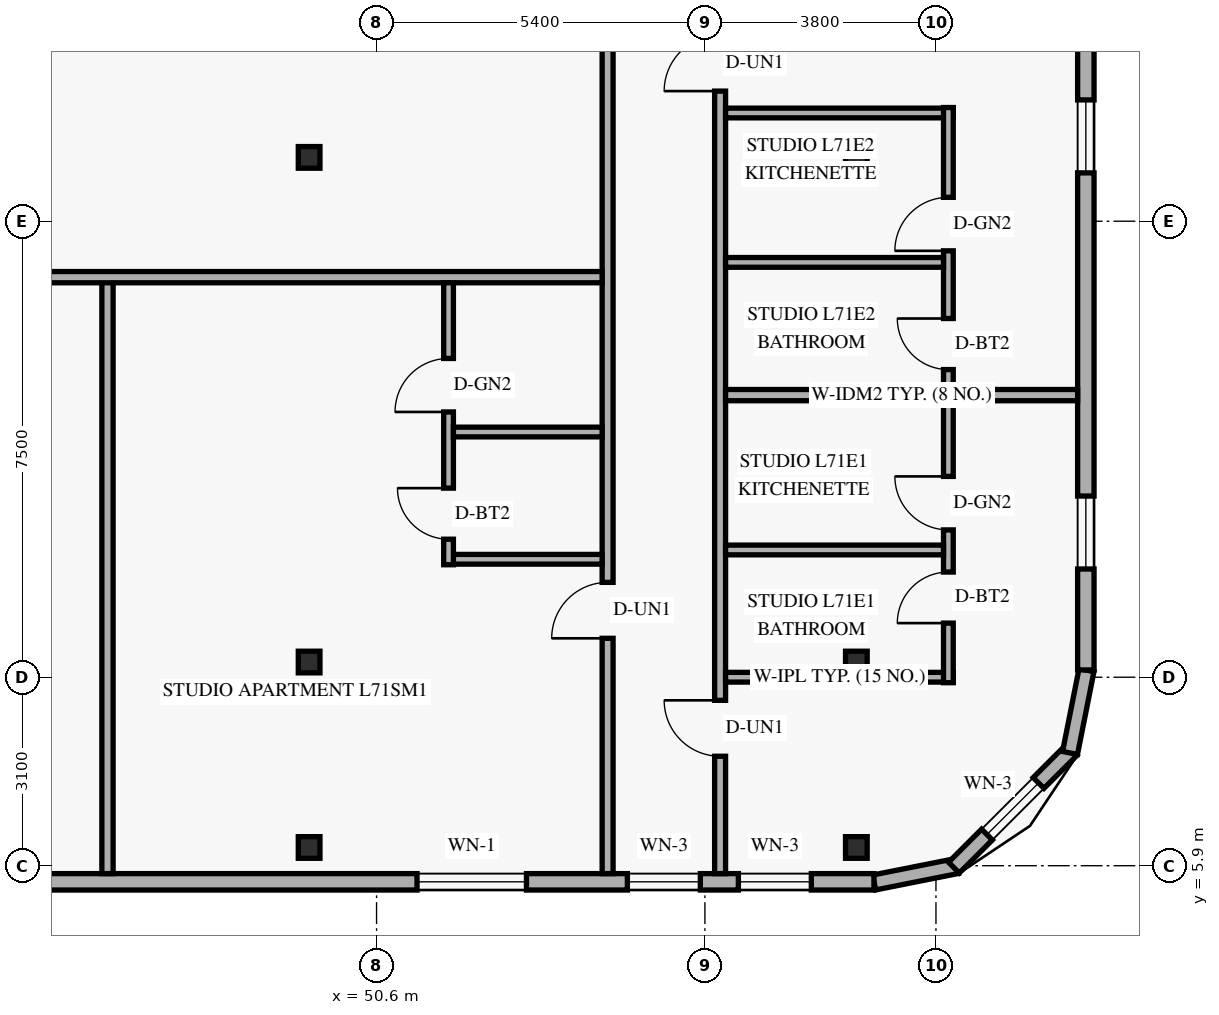
"""IFC4 building model, lengths in metres.
Left out: names, types, materials, properties, quantities, classifications, styles, units other than length and angle.
Written with IfcOpenShell. Run it as: python <this file> out.ifc"""

import sys

from ifc_helpers import new_model, si_unit, direction, frame, frame_2d, origin, origin_2d, place, context, subcontext, project, spatial, rectangle, hollow_rectangle, extrude, element, fill, save


model = new_model("IFC4")
c1 = context("Model", 3, precision=1e-05, world=origin(), true_north=direction((0.0, 1.0)))
c2 = subcontext(c1, "Body", "Model", "MODEL_VIEW")
j1 = project(units=[si_unit("LENGTHUNIT", "METRE"), si_unit("PLANEANGLEUNIT", "RADIAN")], contexts=[c1])
p1 = place(None, origin())
s1 = spatial("IfcSite", under=j1, at=p1, CompositionType="ELEMENT")
p2 = place(p1, origin())
s2 = spatial("IfcBuilding", under=s1, at=p2, CompositionType="ELEMENT")
p3 = place(p2, frame((0.0, 0.0, 271.2)))
s3 = spatial("IfcBuildingStorey", under=s2, at=p3, CompositionType="ELEMENT", Elevation=271.2)
for number, where, z_axis, x_axis in (
    (1, (49.428, 6.2, 0.0), (0.035, 0.0, 0.999), (0.0, 1.0, 0.0)),
    (2, (49.428, 9.25, 0.0), (0.035, 0.0, 0.999), (0.0, 1.0, 0.0)),
    (3, (49.428, 17.55, 0.0), (0.035, 0.0, 0.999), (0.0, 1.0, 0.0)),
):
    element("IfcColumn", number, at=place(p3, frame(where, z_axis=z_axis, x_axis=x_axis)), inside=s3, PredefinedType="COLUMN", context=c2, shape_type="SweptSolid", body=[
        extrude(hollow_rectangle(XDim=0.356, YDim=0.356, WallThickness=0.016, at=origin_2d()), origin(), (0.0, 0.0, 1.0), 3.602),
    ])
for number, where, z_axis, x_axis in (
    (4, (58.386, 6.2, 0.0), (0.058, 0.0, 0.998), (0.0, 1.0, 0.0)),
    (5, (58.386, 9.25, 0.0), (0.058, 0.0, 0.998), (0.0, 1.0, 0.0)),
    (6, (58.386, 17.55, 0.0), (0.058, 0.0, 0.998), (0.0, 1.0, 0.0)),
):
    element("IfcColumn", number, at=place(p3, frame(where, z_axis=z_axis, x_axis=x_axis)), inside=s3, PredefinedType="COLUMN", context=c2, shape_type="SweptSolid", body=[
        extrude(hollow_rectangle(XDim=0.356, YDim=0.356, WallThickness=0.016, at=origin_2d()), origin(), (0.0, 0.0, 1.0), 3.606),
    ])
p4 = place(p3, frame((58.783, 5.624, 0.0), z_axis=(0.0, 0.0, 1.0), x_axis=(0.980809899341, 0.19496651342, 0.0)))
e7 = element("IfcWall", 7, at=p4, inside=s3, PredefinedType="SOLIDWALL", context=c2, shape_type="SweptSolid", body=[
    extrude(rectangle(XDim=1.389, YDim=0.25, at=frame_2d((0.694, 0.0))), origin(), (0.0, 0.0, 1.0), 3.36),
])
p5 = place(p3, frame((60.095, 5.868, 0.0), z_axis=(0.0, 0.0, 1.0), x_axis=(0.707106781187, 0.707106781187, 0.0)))
e8 = element("IfcWall", 8, at=p5, inside=s3, PredefinedType="SOLIDWALL", context=c2, shape_type="SweptSolid", body=[
    extrude(rectangle(XDim=2.739, YDim=0.25, at=frame_2d((1.37, 0.0))), origin(), (0.0, 0.0, 1.0), 3.36),
])
p6 = place(p5, frame((0.77, 0.0, 0.85)))
e9 = element("IfcOpeningElement", 9, at=p6, cuts=e8, PredefinedType="OPENING", context=c2, shape_type="SweptSolid", body=[
    extrude(rectangle(XDim=1.2, YDim=1.5, at=frame_2d((0.6, 0.75))), frame((0.0, 0.135, 0.0), z_axis=(0.0, -1.0, 0.0), x_axis=(1.0, 0.0, 0.0)), (0.0, 0.0, 1.0), 0.27),
])
p7 = place(p3, frame((62.005, 7.754, 0.0), z_axis=(0.0, 0.0, 1.0), x_axis=(0.195135625965, 0.9807762678, 0.0)))
e10 = element("IfcWall", 10, at=p7, inside=s3, PredefinedType="SOLIDWALL", context=c2, shape_type="SweptSolid", body=[
    extrude(rectangle(XDim=1.389, YDim=0.25, at=frame_2d((0.694, 0.0))), origin(), (0.0, 0.0, 1.0), 3.36),
])
p8 = place(p3, frame((25.82, 5.635, 0.0), z_axis=(0.0, 0.0, 1.0), x_axis=(1.0, 0.0, 0.0)))
e11 = element("IfcWall", 11, at=p8, inside=s3, PredefinedType="SOLIDWALL", context=c2, shape_type="SweptSolid", body=[
    extrude(rectangle(XDim=32.96, YDim=0.27, at=frame_2d((16.48, 0.0))), origin(), (0.0, 0.0, 1.0), 3.36),
])
p9 = place(p8, frame((14.188, 0.0, 0.85)))
e12 = element("IfcOpeningElement", 12, at=p9, cuts=e11, PredefinedType="OPENING", context=c2, shape_type="SweptSolid", body=[
    extrude(rectangle(XDim=1.8, YDim=1.6, at=frame_2d((0.9, 0.8))), frame((0.0, 0.145, 0.0), z_axis=(0.0, -1.0, 0.0), x_axis=(1.0, 0.0, 0.0)), (0.0, 0.0, 1.0), 0.29),
])
p10 = place(p8, frame((25.446, 0.0, 0.85)))
e13 = element("IfcOpeningElement", 13, at=p10, cuts=e11, PredefinedType="OPENING", context=c2, shape_type="SweptSolid", body=[
    extrude(rectangle(XDim=1.8, YDim=1.6, at=frame_2d((0.9, 0.8))), frame((0.0, 0.145, 0.0), z_axis=(0.0, -1.0, 0.0), x_axis=(1.0, 0.0, 0.0)), (0.0, 0.0, 1.0), 0.29),
])
p11 = place(p8, frame((28.905, 0.0, 0.85)))
e14 = element("IfcOpeningElement", 14, at=p11, cuts=e11, PredefinedType="OPENING", context=c2, shape_type="SweptSolid", body=[
    extrude(rectangle(XDim=1.2, YDim=1.5, at=frame_2d((0.6, 0.75))), frame((0.0, 0.145, 0.0), z_axis=(0.0, -1.0, 0.0), x_axis=(1.0, 0.0, 0.0)), (0.0, 0.0, 1.0), 0.29),
])
p12 = place(p8, frame((30.73, 0.0, 0.85)))
e15 = element("IfcOpeningElement", 15, at=p12, cuts=e11, PredefinedType="OPENING", context=c2, shape_type="SweptSolid", body=[
    extrude(rectangle(XDim=1.2, YDim=1.5, at=frame_2d((0.6, 0.75))), frame((0.0, 0.145, 0.0), z_axis=(0.0, -1.0, 0.0), x_axis=(1.0, 0.0, 0.0)), (0.0, 0.0, 1.0), 0.29),
])
p13 = place(p3, frame((62.265, 9.12, 0.0), z_axis=(0.0, 0.0, 1.0), x_axis=(0.0, 1.0, 0.0)))
e16 = element("IfcWall", 16, at=p13, inside=s3, PredefinedType="SOLIDWALL", context=c2, shape_type="SweptSolid", body=[
    extrude(rectangle(XDim=29.76, YDim=0.27, at=frame_2d((14.88, 0.0))), origin(), (0.0, 0.0, 1.0), 3.36),
])
p14 = place(p13, frame((1.66, 0.0, 0.85)))
e17 = element("IfcOpeningElement", 17, at=p14, cuts=e16, PredefinedType="OPENING", context=c2, shape_type="SweptSolid", body=[
    extrude(rectangle(XDim=1.2, YDim=1.5, at=frame_2d((0.6, 0.75))), frame((0.0, 0.145, 0.0), z_axis=(0.0, -1.0, 0.0), x_axis=(1.0, 0.0, 0.0)), (0.0, 0.0, 1.0), 0.29),
])
p15 = place(p13, frame((8.175, 0.0, 0.85)))
e18 = element("IfcOpeningElement", 18, at=p15, cuts=e16, PredefinedType="OPENING", context=c2, shape_type="SweptSolid", body=[
    extrude(rectangle(XDim=1.2, YDim=1.5, at=frame_2d((0.6, 0.75))), frame((0.0, 0.145, 0.0), z_axis=(0.0, -1.0, 0.0), x_axis=(1.0, 0.0, 0.0)), (0.0, 0.0, 1.0), 0.29),
])
p16 = place(p13, frame((16.685, 0.0, 0.85)))
e19 = element("IfcOpeningElement", 19, at=p16, cuts=e16, PredefinedType="OPENING", context=c2, shape_type="SweptSolid", body=[
    extrude(rectangle(XDim=1.2, YDim=1.5, at=frame_2d((0.6, 0.75))), frame((0.0, 0.145, 0.0), z_axis=(0.0, -1.0, 0.0), x_axis=(1.0, 0.0, 0.0)), (0.0, 0.0, 1.0), 0.29),
])
p17 = place(p13, frame((23.9, 0.0, 0.85)))
e20 = element("IfcOpeningElement", 20, at=p17, cuts=e16, PredefinedType="OPENING", context=c2, shape_type="SweptSolid", body=[
    extrude(rectangle(XDim=1.2, YDim=1.5, at=frame_2d((0.6, 0.75))), frame((0.0, 0.145, 0.0), z_axis=(0.0, -1.0, 0.0), x_axis=(1.0, 0.0, 0.0)), (0.0, 0.0, 1.0), 0.29),
])
p18 = place(p13, frame((28.01, 0.0, 0.85)))
e21 = element("IfcOpeningElement", 21, at=p18, cuts=e16, PredefinedType="OPENING", context=c2, shape_type="SweptSolid", body=[
    extrude(rectangle(XDim=1.2, YDim=1.5, at=frame_2d((0.6, 0.75))), frame((0.0, 0.145, 0.0), z_axis=(0.0, -1.0, 0.0), x_axis=(1.0, 0.0, 0.0)), (0.0, 0.0, 1.0), 0.29),
])
p19 = place(p3, frame((54.4, 5.77, 0.0), z_axis=(0.0, 0.0, 1.0), x_axis=(0.0, 1.0, 0.0)))
e22 = element("IfcWall", 22, at=p19, inside=s3, PredefinedType="STANDARD", context=c2, shape_type="SweptSolid", body=[
    extrude(rectangle(XDim=14.63, YDim=0.18, at=frame_2d((7.315, 0.0))), origin(), (0.0, 0.0, 1.0), 2.803),
])
p20 = place(p19, frame((3.87, 0.0, 0.0)))
e23 = element("IfcOpeningElement", 23, at=p20, cuts=e22, PredefinedType="OPENING", context=c2, shape_type="SweptSolid", body=[
    extrude(rectangle(XDim=0.92, YDim=2.15, at=frame_2d((0.46, 1.075))), frame((0.0, 0.1, 0.0), z_axis=(0.0, -1.0, 0.0), x_axis=(1.0, 0.0, 0.0)), (0.0, 0.0, 1.0), 0.2),
])
p21 = place(p3, frame((56.25, 5.77, 0.0), z_axis=(0.0, 0.0, 1.0), x_axis=(0.0, 1.0, 0.0)))
e24 = element("IfcWall", 24, at=p21, inside=s3, PredefinedType="STANDARD", context=c2, shape_type="SweptSolid", body=[
    extrude(rectangle(XDim=36.46, YDim=0.18, at=frame_2d((18.23, 0.0))), origin(), (0.0, 0.0, 1.0), 2.803),
])
p22 = place(p21, frame((1.93, 0.0, 0.0)))
e25 = element("IfcOpeningElement", 25, at=p22, cuts=e24, PredefinedType="OPENING", context=c2, shape_type="SweptSolid", body=[
    extrude(rectangle(XDim=0.92, YDim=2.15, at=frame_2d((0.46, 1.075))), frame((0.0, 0.1, 0.0), z_axis=(0.0, -1.0, 0.0), x_axis=(1.0, 0.0, 0.0)), (0.0, 0.0, 1.0), 0.2),
])
p23 = place(p21, frame((12.87, 0.0, 0.0)))
e26 = element("IfcOpeningElement", 26, at=p23, cuts=e24, PredefinedType="OPENING", context=c2, shape_type="SweptSolid", body=[
    extrude(rectangle(XDim=0.92, YDim=2.15, at=frame_2d((0.46, 1.075))), frame((0.0, 0.1, 0.0), z_axis=(0.0, -1.0, 0.0), x_axis=(1.0, 0.0, 0.0)), (0.0, 0.0, 1.0), 0.2),
])
p24 = place(p21, frame((21.38, 0.0, 0.0)))
e27 = element("IfcOpeningElement", 27, at=p24, cuts=e24, PredefinedType="OPENING", context=c2, shape_type="SweptSolid", body=[
    extrude(rectangle(XDim=0.92, YDim=2.15, at=frame_2d((0.46, 1.075))), frame((0.0, 0.1, 0.0), z_axis=(0.0, -1.0, 0.0), x_axis=(1.0, 0.0, 0.0)), (0.0, 0.0, 1.0), 0.2),
])
p25 = place(p21, frame((27.39, 0.0, 0.0)))
e28 = element("IfcOpeningElement", 28, at=p25, cuts=e24, PredefinedType="OPENING", context=c2, shape_type="SweptSolid", body=[
    extrude(rectangle(XDim=0.92, YDim=2.15, at=frame_2d((0.46, 1.075))), frame((0.0, 0.1, 0.0), z_axis=(0.0, -1.0, 0.0), x_axis=(1.0, 0.0, 0.0)), (0.0, 0.0, 1.0), 0.2),
])
p26 = place(p21, frame((33.235, 0.0, 0.0)))
e29 = element("IfcOpeningElement", 29, at=p26, cuts=e24, PredefinedType="OPENING", context=c2, shape_type="SweptSolid", body=[
    extrude(rectangle(XDim=0.92, YDim=2.15, at=frame_2d((0.46, 1.075))), frame((0.0, 0.1, 0.0), z_axis=(0.0, -1.0, 0.0), x_axis=(1.0, 0.0, 0.0)), (0.0, 0.0, 1.0), 0.2),
])
p27 = place(p3, frame((56.34, 9.0, 0.0), z_axis=(0.0, 0.0, 1.0), x_axis=(1.0, 0.0, 0.0)))
e30 = element("IfcWall", 30, at=p27, inside=s3, PredefinedType="PLUMBINGWALL", context=c2, shape_type="SweptSolid", body=[
    extrude(rectangle(XDim=3.744, YDim=0.16, at=frame_2d((1.872, 0.0))), origin(), (0.0, 0.0, 1.0), 2.879),
])
p28 = place(p3, frame((60.004, 8.91, 0.0), z_axis=(0.0, 0.0, 1.0), x_axis=(0.0, 1.0, 0.0)))
e31 = element("IfcWall", 31, at=p28, inside=s3, PredefinedType="PLUMBINGWALL", context=c2, shape_type="SweptSolid", body=[
    extrude(rectangle(XDim=4.73, YDim=0.16, at=frame_2d((2.365, 0.0))), origin(), (0.0, 0.0, 1.0), 3.36),
])
p29 = place(p28, frame((0.98, 0.0, 0.0)))
e32 = element("IfcOpeningElement", 32, at=p29, cuts=e31, PredefinedType="OPENING", context=c2, shape_type="SweptSolid", body=[
    extrude(rectangle(XDim=0.84, YDim=2.12, at=frame_2d((0.42, 1.06))), frame((0.0, 0.09, 0.0), z_axis=(0.0, -1.0, 0.0), x_axis=(1.0, 0.0, 0.0)), (0.0, 0.0, 1.0), 0.18),
])
p30 = place(p28, frame((2.513, 0.0, 0.0)))
e33 = element("IfcOpeningElement", 33, at=p30, cuts=e31, PredefinedType="OPENING", context=c2, shape_type="SweptSolid", body=[
    extrude(rectangle(XDim=0.88, YDim=2.12, at=frame_2d((0.44, 1.06))), frame((0.0, 0.09, 0.0), z_axis=(0.0, -1.0, 0.0), x_axis=(1.0, 0.0, 0.0)), (0.0, 0.0, 1.0), 0.18),
])
p31 = place(p3, frame((56.34, 11.093, 0.0), z_axis=(0.0, 0.0, 1.0), x_axis=(1.0, 0.0, 0.0)))
e34 = element("IfcWall", 34, at=p31, inside=s3, PredefinedType="PLUMBINGWALL", context=c2, shape_type="SweptSolid", body=[
    extrude(rectangle(XDim=3.584, YDim=0.16, at=frame_2d((1.792, 0.0))), origin(), (0.0, 0.0, 1.0), 2.879),
])
p32 = place(p3, frame((56.34, 13.64, 0.0), z_axis=(0.0, 0.0, 1.0), x_axis=(1.0, 0.0, 0.0)))
e35 = element("IfcWall", 35, at=p32, inside=s3, PredefinedType="PARTITIONING", context=c2, shape_type="SweptSolid", body=[
    extrude(rectangle(XDim=5.79, YDim=0.185, at=frame_2d((2.895, 0.0))), origin(), (0.0, 0.0, 1.0), 2.879),
])
p33 = place(p3, frame((56.34, 18.28, 0.0), z_axis=(0.0, 0.0, 1.0), x_axis=(1.0, 0.0, 0.0)))
e36 = element("IfcWall", 36, at=p33, inside=s3, PredefinedType="PLUMBINGWALL", context=c2, shape_type="SweptSolid", body=[
    extrude(rectangle(XDim=3.744, YDim=0.16, at=frame_2d((1.872, 0.0))), origin(), (0.0, 0.0, 1.0), 2.879),
])
p34 = place(p3, frame((60.004, 13.732, 0.0), z_axis=(0.0, 0.0, 1.0), x_axis=(0.0, 1.0, 0.0)))
e37 = element("IfcWall", 37, at=p34, inside=s3, PredefinedType="PLUMBINGWALL", context=c2, shape_type="SweptSolid", body=[
    extrude(rectangle(XDim=4.638, YDim=0.16, at=frame_2d((2.319, 0.0))), origin(), (0.0, 0.0, 1.0), 3.36),
])
p35 = place(p34, frame((0.327, 0.0, 0.0)))
e38 = element("IfcOpeningElement", 38, at=p35, cuts=e37, PredefinedType="OPENING", context=c2, shape_type="SweptSolid", body=[
    extrude(rectangle(XDim=0.84, YDim=2.12, at=frame_2d((0.42, 1.06))), frame((0.0, 0.09, 0.0), z_axis=(0.0, -1.0, 0.0), x_axis=(1.0, 0.0, 0.0)), (0.0, 0.0, 1.0), 0.18),
])
p36 = place(p34, frame((2.281, 0.0, 0.0)))
e39 = element("IfcOpeningElement", 39, at=p36, cuts=e37, PredefinedType="OPENING", context=c2, shape_type="SweptSolid", body=[
    extrude(rectangle(XDim=0.88, YDim=2.12, at=frame_2d((0.44, 1.06))), frame((0.0, 0.09, 0.0), z_axis=(0.0, -1.0, 0.0), x_axis=(1.0, 0.0, 0.0)), (0.0, 0.0, 1.0), 0.18),
])
p37 = place(p3, frame((56.34, 15.823, 0.0), z_axis=(0.0, 0.0, 1.0), x_axis=(1.0, 0.0, 0.0)))
e40 = element("IfcWall", 40, at=p37, inside=s3, PredefinedType="PLUMBINGWALL", context=c2, shape_type="SweptSolid", body=[
    extrude(rectangle(XDim=3.584, YDim=0.16, at=frame_2d((1.792, 0.0))), origin(), (0.0, 0.0, 1.0), 2.879),
])
p38 = place(p3, frame((46.175, 5.77, 0.0), z_axis=(0.0, 0.0, 1.0), x_axis=(0.0, 1.0, 0.0)))
e41 = element("IfcWall", 41, at=p38, inside=s3, PredefinedType="PARTITIONING", context=c2, shape_type="SweptSolid", body=[
    extrude(rectangle(XDim=9.81, YDim=0.185, at=frame_2d((4.905, 0.0))), origin(), (0.0, 0.0, 1.0), 2.803),
])
p39 = place(p3, frame((38.022, 15.58, 0.0), z_axis=(0.0, 0.0, 1.0), x_axis=(1.0, 0.0, 0.0)))
e42 = element("IfcWall", 42, at=p39, inside=s3, PredefinedType="PARTITIONING", context=c2, shape_type="SweptSolid", body=[
    extrude(rectangle(XDim=16.288, YDim=0.185, at=frame_2d((8.144, 0.0))), origin(), (0.0, 0.0, 1.0), 2.803),
])
p40 = place(p3, frame((51.704, 10.94, 0.0), z_axis=(0.0, 0.0, 1.0), x_axis=(1.0, 0.0, 0.0)))
e43 = element("IfcWall", 43, at=p40, inside=s3, PredefinedType="PLUMBINGWALL", context=c2, shape_type="SweptSolid", body=[
    extrude(rectangle(XDim=2.606, YDim=0.16, at=frame_2d((1.303, 0.0))), origin(), (0.0, 0.0, 1.0), 3.36),
])
p41 = place(p3, frame((51.784, 10.85, 0.0), z_axis=(0.0, 0.0, 1.0), x_axis=(0.0, 1.0, 0.0)))
e44 = element("IfcWall", 44, at=p41, inside=s3, PredefinedType="PLUMBINGWALL", context=c2, shape_type="SweptSolid", body=[
    extrude(rectangle(XDim=4.637, YDim=0.16, at=frame_2d((2.319, 0.0))), origin(), (0.0, 0.0, 1.0), 3.039),
])
p42 = place(p41, frame((0.42, 0.0, 0.0)))
e45 = element("IfcOpeningElement", 45, at=p42, cuts=e44, PredefinedType="OPENING", context=c2, shape_type="SweptSolid", body=[
    extrude(rectangle(XDim=0.84, YDim=2.12, at=frame_2d((0.42, 1.06))), frame((0.0, 0.09, 0.0), z_axis=(0.0, -1.0, 0.0), x_axis=(1.0, 0.0, 0.0)), (0.0, 0.0, 1.0), 0.18),
])
p43 = place(p41, frame((2.513, 0.0, 0.0)))
e46 = element("IfcOpeningElement", 46, at=p43, cuts=e44, PredefinedType="OPENING", context=c2, shape_type="SweptSolid", body=[
    extrude(rectangle(XDim=0.88, YDim=2.12, at=frame_2d((0.44, 1.06))), frame((0.0, 0.09, 0.0), z_axis=(0.0, -1.0, 0.0), x_axis=(1.0, 0.0, 0.0)), (0.0, 0.0, 1.0), 0.18),
])
p44 = place(p3, frame((51.864, 13.033, 0.0), z_axis=(0.0, 0.0, 1.0), x_axis=(1.0, 0.0, 0.0)))
e47 = element("IfcWall", 47, at=p44, inside=s3, PredefinedType="PLUMBINGWALL", context=c2, shape_type="SweptSolid", body=[
    extrude(rectangle(XDim=2.446, YDim=0.16, at=frame_2d((1.223, 0.0))), origin(), (0.0, 0.0, 1.0), 3.36),
])
p45 = place(p6, origin())
e48 = element("IfcWindow", 48, at=p45, inside=s3, PartitioningType="SINGLE_PANEL", PredefinedType="WINDOW", context=c2, shape_type="SweptSolid", body=[
    extrude(rectangle(XDim=1.2, YDim=1.5, at=frame_2d((0.6, 0.75))), frame((0.0, 0.03, 0.0), z_axis=(0.0, -1.0, 0.0), x_axis=(1.0, 0.0, 0.0)), (0.0, 0.0, 1.0), 0.06),
])
fill(e9, e48)
p46 = place(p10, origin())
e49 = element("IfcWindow", 49, at=p46, inside=s3, PartitioningType="SINGLE_PANEL", PredefinedType="WINDOW", context=c2, shape_type="SweptSolid", body=[
    extrude(rectangle(XDim=1.8, YDim=1.6, at=frame_2d((0.9, 0.8))), frame((0.0, 0.03, 0.0), z_axis=(0.0, -1.0, 0.0), x_axis=(1.0, 0.0, 0.0)), (0.0, 0.0, 1.0), 0.06),
])
fill(e13, e49)
p47 = place(p11, origin())
e50 = element("IfcWindow", 50, at=p47, inside=s3, PartitioningType="SINGLE_PANEL", PredefinedType="WINDOW", context=c2, shape_type="SweptSolid", body=[
    extrude(rectangle(XDim=1.2, YDim=1.5, at=frame_2d((0.6, 0.75))), frame((0.0, 0.03, 0.0), z_axis=(0.0, -1.0, 0.0), x_axis=(1.0, 0.0, 0.0)), (0.0, 0.0, 1.0), 0.06),
])
fill(e14, e50)
p48 = place(p12, origin())
e51 = element("IfcWindow", 51, at=p48, inside=s3, PartitioningType="SINGLE_PANEL", PredefinedType="WINDOW", context=c2, shape_type="SweptSolid", body=[
    extrude(rectangle(XDim=1.2, YDim=1.5, at=frame_2d((0.6, 0.75))), frame((0.0, 0.03, 0.0), z_axis=(0.0, -1.0, 0.0), x_axis=(1.0, 0.0, 0.0)), (0.0, 0.0, 1.0), 0.06),
])
fill(e15, e51)
p49 = place(p14, origin())
e52 = element("IfcWindow", 52, at=p49, inside=s3, PartitioningType="SINGLE_PANEL", PredefinedType="WINDOW", context=c2, shape_type="SweptSolid", body=[
    extrude(rectangle(XDim=1.2, YDim=1.5, at=frame_2d((0.6, 0.75))), frame((0.0, 0.03, 0.0), z_axis=(0.0, -1.0, 0.0), x_axis=(1.0, 0.0, 0.0)), (0.0, 0.0, 1.0), 0.06),
])
fill(e17, e52)
p50 = place(p15, origin())
e53 = element("IfcWindow", 53, at=p50, inside=s3, PartitioningType="SINGLE_PANEL", PredefinedType="WINDOW", context=c2, shape_type="SweptSolid", body=[
    extrude(rectangle(XDim=1.2, YDim=1.5, at=frame_2d((0.6, 0.75))), frame((0.0, 0.03, 0.0), z_axis=(0.0, -1.0, 0.0), x_axis=(1.0, 0.0, 0.0)), (0.0, 0.0, 1.0), 0.06),
])
fill(e18, e53)
p51 = place(p22, origin())
e54 = element("IfcDoor", 54, at=p51, inside=s3, OperationType="SINGLE_SWING_RIGHT", PredefinedType="DOOR", context=c2, shape_type="SweptSolid", body=[
    extrude(rectangle(XDim=0.92, YDim=2.15, at=frame_2d((0.46, 1.075))), frame((0.0, 0.025, 0.0), z_axis=(0.0, -1.0, 0.0), x_axis=(1.0, 0.0, 0.0)), (0.0, 0.0, 1.0), 0.05),
])
fill(e25, e54)
p52 = place(p29, origin())
e55 = element("IfcDoor", 55, at=p52, inside=s3, OperationType="SINGLE_SWING_LEFT", PredefinedType="DOOR", context=c2, shape_type="SweptSolid", body=[
    extrude(rectangle(XDim=0.84, YDim=2.12, at=frame_2d((0.42, 1.06))), frame((0.0, 0.025, 0.0), z_axis=(0.0, -1.0, 0.0), x_axis=(1.0, 0.0, 0.0)), (0.0, 0.0, 1.0), 0.05),
])
fill(e32, e55)
p53 = place(p30, origin())
e56 = element("IfcDoor", 56, at=p53, inside=s3, OperationType="SINGLE_SWING_RIGHT", PredefinedType="DOOR", context=c2, shape_type="SweptSolid", body=[
    extrude(rectangle(XDim=0.88, YDim=2.12, at=frame_2d((0.44, 1.06))), frame((0.0, 0.025, 0.0), z_axis=(0.0, -1.0, 0.0), x_axis=(1.0, 0.0, 0.0)), (0.0, 0.0, 1.0), 0.05),
])
fill(e33, e56)
p54 = place(p23, origin())
e57 = element("IfcDoor", 57, at=p54, inside=s3, OperationType="SINGLE_SWING_LEFT", PredefinedType="DOOR", context=c2, shape_type="SweptSolid", body=[
    extrude(rectangle(XDim=0.92, YDim=2.15, at=frame_2d((0.46, 1.075))), frame((0.0, 0.025, 0.0), z_axis=(0.0, -1.0, 0.0), x_axis=(1.0, 0.0, 0.0)), (0.0, 0.0, 1.0), 0.05),
])
fill(e26, e57)
p55 = place(p35, origin())
e58 = element("IfcDoor", 58, at=p55, inside=s3, OperationType="SINGLE_SWING_RIGHT", PredefinedType="DOOR", context=c2, shape_type="SweptSolid", body=[
    extrude(rectangle(XDim=0.84, YDim=2.12, at=frame_2d((0.42, 1.06))), frame((0.0, 0.025, 0.0), z_axis=(0.0, -1.0, 0.0), x_axis=(1.0, 0.0, 0.0)), (0.0, 0.0, 1.0), 0.05),
])
fill(e38, e58)
p56 = place(p36, origin())
e59 = element("IfcDoor", 59, at=p56, inside=s3, OperationType="SINGLE_SWING_LEFT", PredefinedType="DOOR", context=c2, shape_type="SweptSolid", body=[
    extrude(rectangle(XDim=0.88, YDim=2.12, at=frame_2d((0.44, 1.06))), frame((0.0, 0.025, 0.0), z_axis=(0.0, -1.0, 0.0), x_axis=(1.0, 0.0, 0.0)), (0.0, 0.0, 1.0), 0.05),
])
fill(e39, e59)
p57 = place(p20, origin())
e60 = element("IfcDoor", 60, at=p57, inside=s3, OperationType="SINGLE_SWING_LEFT", PredefinedType="DOOR", context=c2, shape_type="SweptSolid", body=[
    extrude(rectangle(XDim=0.92, YDim=2.15, at=frame_2d((0.46, 1.075))), frame((0.0, 0.025, 0.0), z_axis=(0.0, -1.0, 0.0), x_axis=(1.0, 0.0, 0.0)), (0.0, 0.0, 1.0), 0.05),
])
fill(e23, e60)
p58 = place(p42, origin())
e61 = element("IfcDoor", 61, at=p58, inside=s3, OperationType="SINGLE_SWING_RIGHT", PredefinedType="DOOR", context=c2, shape_type="SweptSolid", body=[
    extrude(rectangle(XDim=0.84, YDim=2.12, at=frame_2d((0.42, 1.06))), frame((0.0, 0.025, 0.0), z_axis=(0.0, -1.0, 0.0), x_axis=(1.0, 0.0, 0.0)), (0.0, 0.0, 1.0), 0.05),
])
fill(e45, e61)
p59 = place(p43, origin())
e62 = element("IfcDoor", 62, at=p59, inside=s3, OperationType="SINGLE_SWING_LEFT", PredefinedType="DOOR", context=c2, shape_type="SweptSolid", body=[
    extrude(rectangle(XDim=0.88, YDim=2.12, at=frame_2d((0.44, 1.06))), frame((0.0, 0.025, 0.0), z_axis=(0.0, -1.0, 0.0), x_axis=(1.0, 0.0, 0.0)), (0.0, 0.0, 1.0), 0.05),
])
fill(e46, e62)
save(model, sys.argv[1])
